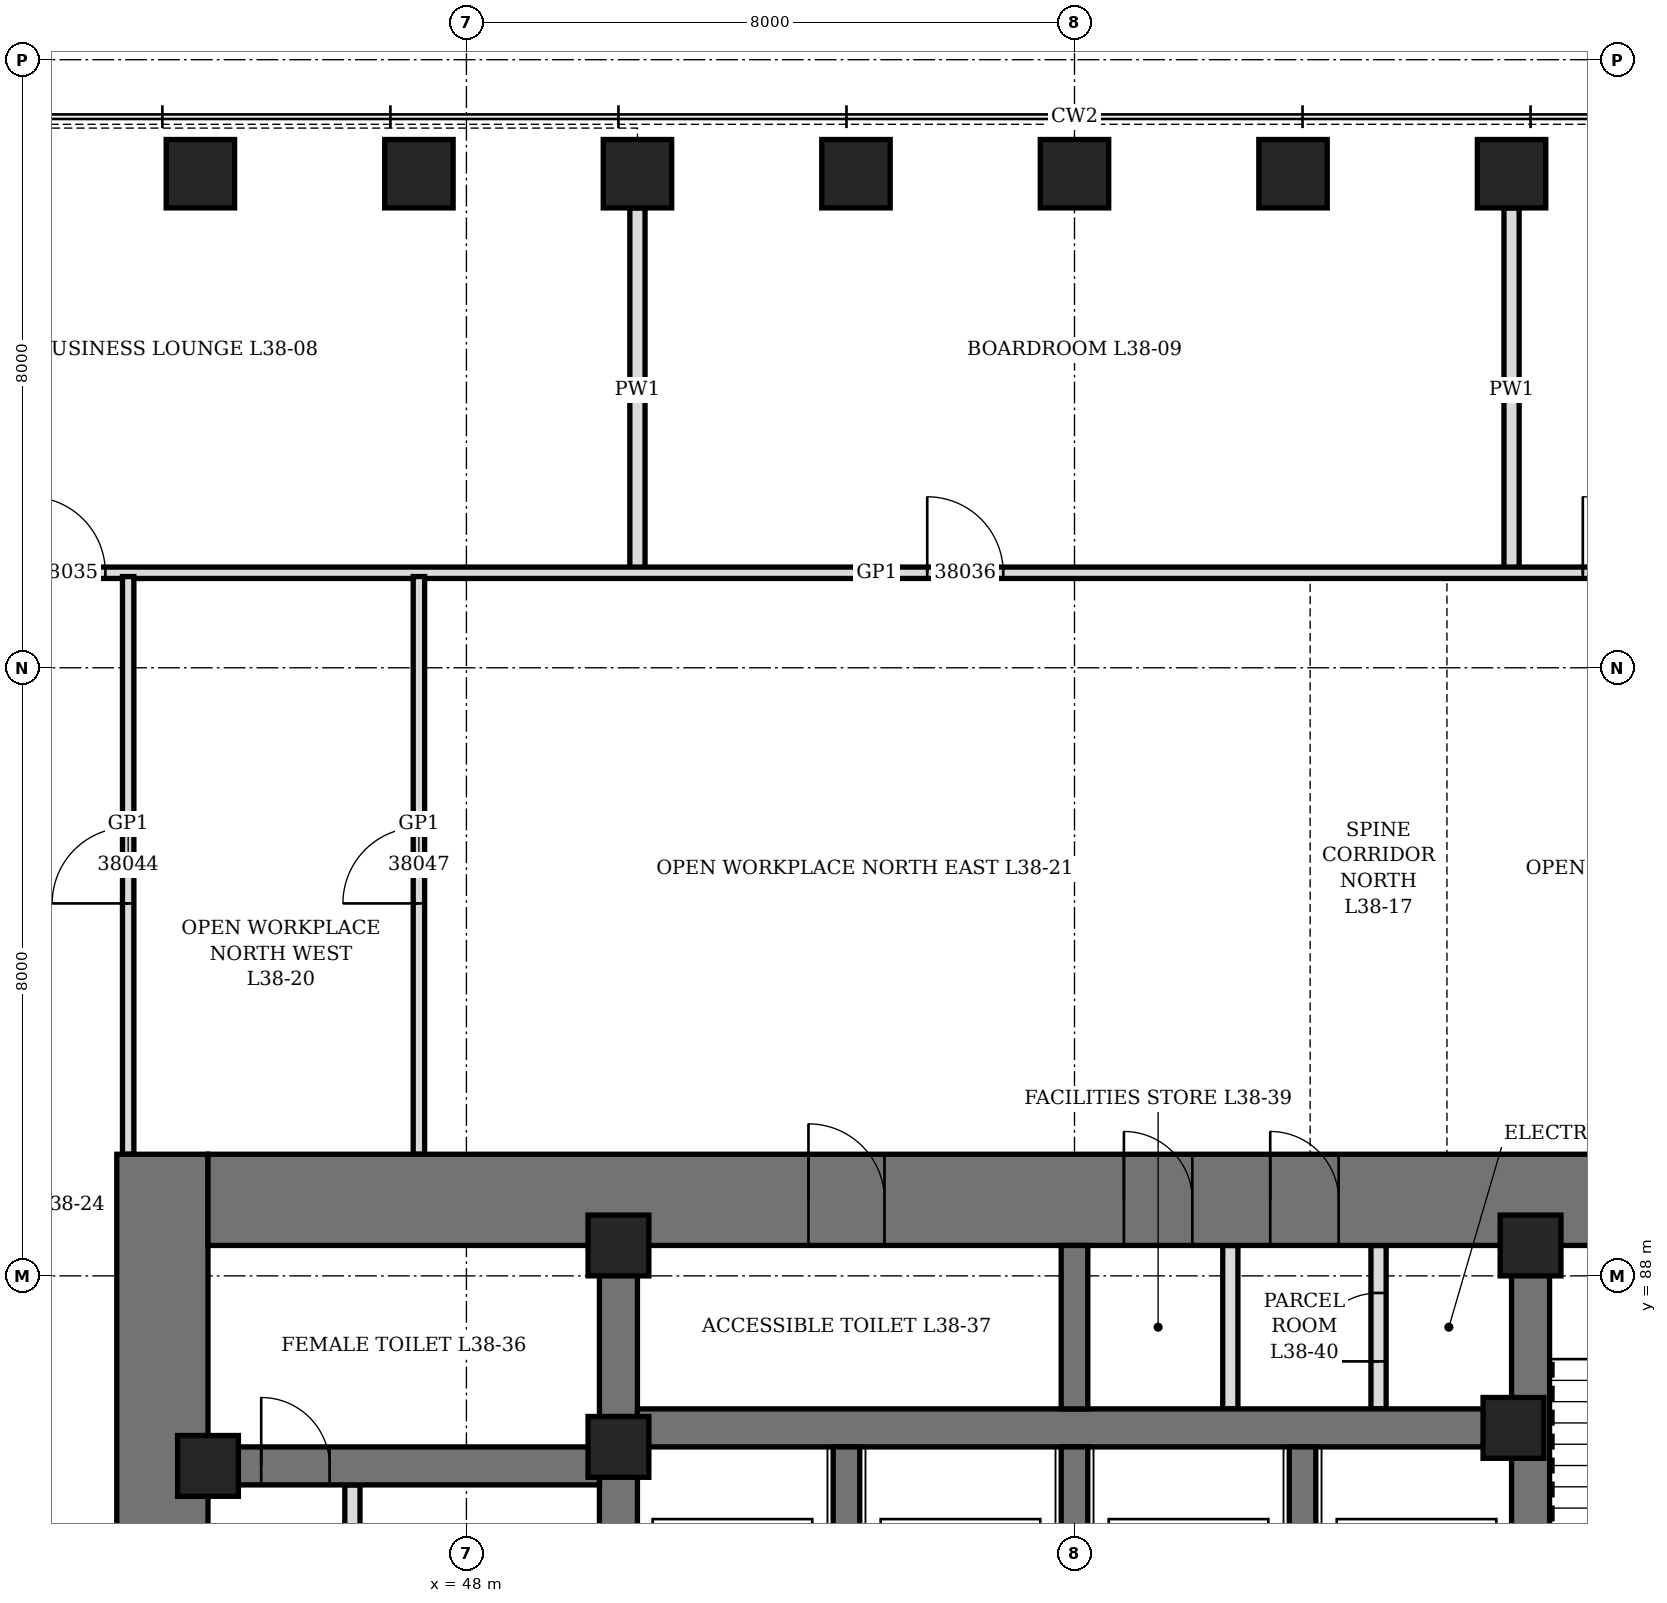
"""IFC4 building model, lengths in metres.
Left out: names, types, materials, properties, quantities, classifications, styles, units other than length and angle.
Written with IfcOpenShell. Run it as: python <this file> out.ifc"""

import sys

from ifc_helpers import new_model, si_unit, direction, frame, frame_2d, origin, origin_2d, place, context, subcontext, project, spatial, rectangle, hollow_rectangle, extrude, element, fill, save


model = new_model("IFC4")
c1 = context("Model", 3, precision=1e-05, world=origin(), true_north=direction((0.0, 1.0)))
c2 = subcontext(c1, "Body", "Model", "MODEL_VIEW")
j1 = project(units=[si_unit("LENGTHUNIT", "METRE"), si_unit("PLANEANGLEUNIT", "RADIAN")], contexts=[c1])
p1 = place(None, origin())
s1 = spatial("IfcSite", under=j1, at=p1, CompositionType="ELEMENT")
p2 = place(p1, origin())
s2 = spatial("IfcBuilding", under=s1, at=p2, CompositionType="ELEMENT")
p3 = place(p2, frame((0.0, 0.0, 171.1)))
s3 = spatial("IfcBuildingStorey", under=s2, at=p3, CompositionType="ELEMENT", Elevation=171.1)
for number, where, z_axis, x_axis in (
    (1, (61.75, 102.5, 0.0), (0.0, 0.0, 1.0), (1.0, 0.0, 0.0)),
    (2, (58.875, 102.5, 0.0), (0.0, 0.0, 1.0), (1.0, 0.0, 0.0)),
    (3, (56.0, 102.5, 0.0), (0.0, 0.0, 1.0), (1.0, 0.0, 0.0)),
    (4, (53.125, 102.5, 0.0), (0.0, 0.0, 1.0), (1.0, 0.0, 0.0)),
    (5, (50.25, 102.5, 0.0), (0.0, 0.0, 1.0), (1.0, 0.0, 0.0)),
    (6, (47.375, 102.5, 0.0), (0.0, 0.0, 1.0), (1.0, 0.0, 0.0)),
    (7, (44.5, 102.5, 0.0), (0.0, 0.0, 1.0), (1.0, 0.0, 0.0)),
):
    element("IfcColumn", number, at=place(p3, frame(where, z_axis=z_axis, x_axis=x_axis)), inside=s3, PredefinedType="COLUMN", context=c2, shape_type="SweptSolid", body=[
        extrude(hollow_rectangle(XDim=0.9, YDim=0.9, WallThickness=0.12, at=origin_2d()), origin(), (0.0, 0.0, 1.0), 4.2),
    ])
p4 = place(p3, frame((44.0, 70.4, 0.0), z_axis=(0.0, 0.0, 1.0), x_axis=(0.0, 1.0, 0.0)))
e8 = element("IfcWall", 8, at=p4, inside=s3, PredefinedType="SHEAR", context=c2, shape_type="SweptSolid", body=[
    extrude(rectangle(XDim=19.2, YDim=1.2, at=frame_2d((9.6, 0.0))), origin(), (0.0, 0.0, 1.0), 4.2),
])
p5 = place(p4, frame((8.6, 0.0, 0.0)))
e9 = element("IfcOpeningElement", 9, at=p5, cuts=e8, PredefinedType="OPENING", context=c2, shape_type="SweptSolid", body=[
    extrude(rectangle(XDim=2.0, YDim=2.4, at=frame_2d((1.0, 1.2))), frame((0.0, 0.61, 0.0), z_axis=(0.0, -1.0, 0.0), x_axis=(1.0, 0.0, 0.0)), (0.0, 0.0, 1.0), 1.22),
])
p6 = place(p3, frame((44.6, 89.0, 0.0), z_axis=(0.0, 0.0, 1.0), x_axis=(1.0, 0.0, 0.0)))
e10 = element("IfcWall", 10, at=p6, inside=s3, PredefinedType="SHEAR", context=c2, shape_type="SweptSolid", body=[
    extrude(rectangle(XDim=22.8, YDim=1.2, at=frame_2d((11.4, 0.0))), origin(), (0.0, 0.0, 1.0), 4.2),
])
p7 = place(p6, frame((7.9, 0.0, 0.0)))
e11 = element("IfcOpeningElement", 11, at=p7, cuts=e10, PredefinedType="OPENING", context=c2, shape_type="SweptSolid", body=[
    extrude(rectangle(XDim=1.0, YDim=2.1, at=frame_2d((0.5, 1.05))), frame((0.0, 0.61, 0.0), z_axis=(0.0, -1.0, 0.0), x_axis=(1.0, 0.0, 0.0)), (0.0, 0.0, 1.0), 1.22),
])
p8 = place(p6, frame((12.05, 0.0, 0.0)))
e12 = element("IfcOpeningElement", 12, at=p8, cuts=e10, PredefinedType="OPENING", context=c2, shape_type="SweptSolid", body=[
    extrude(rectangle(XDim=0.9, YDim=2.1, at=frame_2d((0.45, 1.05))), frame((0.0, 0.61, 0.0), z_axis=(0.0, -1.0, 0.0), x_axis=(1.0, 0.0, 0.0)), (0.0, 0.0, 1.0), 1.22),
])
p9 = place(p6, frame((13.975, 0.0, 0.0)))
e13 = element("IfcOpeningElement", 13, at=p9, cuts=e10, PredefinedType="OPENING", context=c2, shape_type="SweptSolid", body=[
    extrude(rectangle(XDim=0.9, YDim=2.1, at=frame_2d((0.45, 1.05))), frame((0.0, 0.61, 0.0), z_axis=(0.0, -1.0, 0.0), x_axis=(1.0, 0.0, 0.0)), (0.0, 0.0, 1.0), 1.22),
])
p10 = place(p3, frame((50.0, 71.6, 0.0), z_axis=(0.0, 0.0, 1.0), x_axis=(0.0, 1.0, 0.0)))
e14 = element("IfcWall", 14, at=p10, inside=s3, PredefinedType="SHEAR", context=c2, shape_type="SweptSolid", body=[
    extrude(rectangle(XDim=16.8, YDim=0.5, at=frame_2d((8.4, 0.0))), origin(), (0.0, 0.0, 1.0), 4.2),
])
p11 = place(p10, frame((7.5, 0.0, 0.0)))
e15 = element("IfcOpeningElement", 15, at=p11, cuts=e14, PredefinedType="OPENING", context=c2, shape_type="SweptSolid", body=[
    extrude(rectangle(XDim=1.8, YDim=2.4, at=frame_2d((0.9, 1.2))), frame((0.0, 0.26, 0.0), z_axis=(0.0, -1.0, 0.0), x_axis=(1.0, 0.0, 0.0)), (0.0, 0.0, 1.0), 0.52),
])
p12 = place(p3, frame((62.0, 71.6, 0.0), z_axis=(0.0, 0.0, 1.0), x_axis=(0.0, 1.0, 0.0)))
e16 = element("IfcWall", 16, at=p12, inside=s3, PredefinedType="SHEAR", context=c2, shape_type="SweptSolid", body=[
    extrude(rectangle(XDim=16.8, YDim=0.5, at=frame_2d((8.4, 0.0))), origin(), (0.0, 0.0, 1.0), 4.2),
])
p13 = place(p12, frame((7.5, 0.0, 0.0)))
e17 = element("IfcOpeningElement", 17, at=p13, cuts=e16, PredefinedType="OPENING", context=c2, shape_type="SweptSolid", body=[
    extrude(rectangle(XDim=1.8, YDim=2.4, at=frame_2d((0.9, 1.2))), frame((0.0, 0.26, 0.0), z_axis=(0.0, -1.0, 0.0), x_axis=(1.0, 0.0, 0.0)), (0.0, 0.0, 1.0), 0.52),
])
p14 = place(p3, frame((44.6, 85.5, 0.0), z_axis=(0.0, 0.0, 1.0), x_axis=(1.0, 0.0, 0.0)))
e18 = element("IfcWall", 18, at=p14, inside=s3, PredefinedType="SHEAR", context=c2, shape_type="SweptSolid", body=[
    extrude(rectangle(XDim=5.15, YDim=0.5, at=frame_2d((2.575, 0.0))), origin(), (0.0, 0.0, 1.0), 4.2),
])
p15 = place(p14, frame((0.7, 0.0, 0.0)))
e19 = element("IfcOpeningElement", 19, at=p15, cuts=e18, PredefinedType="OPENING", context=c2, shape_type="SweptSolid", body=[
    extrude(rectangle(XDim=0.9, YDim=2.1, at=frame_2d((0.45, 1.05))), frame((0.0, 0.26, 0.0), z_axis=(0.0, -1.0, 0.0), x_axis=(1.0, 0.0, 0.0)), (0.0, 0.0, 1.0), 0.52),
])
p16 = place(p3, frame((50.25, 86.0, 0.0), z_axis=(0.0, 0.0, 1.0), x_axis=(1.0, 0.0, 0.0)))
e20 = element("IfcWall", 20, at=p16, inside=s3, PredefinedType="SHEAR", context=c2, shape_type="SweptSolid", body=[
    extrude(rectangle(XDim=11.5, YDim=0.5, at=frame_2d((5.75, 0.0))), origin(), (0.0, 0.0, 1.0), 4.2),
])
for number, where, z_axis, x_axis in (
    (21, (53.0, 82.25, 0.0), (0.0, 0.0, 1.0), (0.0, 1.0, 0.0)),
    (22, (56.0, 82.25, 0.0), (0.0, 0.0, 1.0), (0.0, 1.0, 0.0)),
    (23, (59.0, 82.25, 0.0), (0.0, 0.0, 1.0), (0.0, 1.0, 0.0)),
):
    element("IfcWall", number, at=place(p3, frame(where, z_axis=z_axis, x_axis=x_axis)), inside=s3, PredefinedType="SHEAR", context=c2, shape_type="SweptSolid", body=[
        extrude(rectangle(XDim=3.5, YDim=0.35, at=frame_2d((1.75, 0.0))), origin(), (0.0, 0.0, 1.0), 4.2),
    ])
p17 = place(p3, frame((56.0, 86.25, 0.0), z_axis=(0.0, 0.0, 1.0), x_axis=(0.0, 1.0, 0.0)))
e24 = element("IfcWall", 24, at=p17, inside=s3, PredefinedType="SHEAR", context=c2, shape_type="SweptSolid", body=[
    extrude(rectangle(XDim=2.15, YDim=0.35, at=frame_2d((1.075, 0.0))), origin(), (0.0, 0.0, 1.0), 4.2),
])
for number, where, z_axis, x_axis in (
    (25, (44.6, 85.5, 0.0), (0.0, 0.0, 1.0), (1.0, 0.0, 0.0)),
    (26, (50.0, 85.75, 0.0), (0.0, 0.0, 1.0), (1.0, 0.0, 0.0)),
    (27, (50.0, 88.4, 0.0), (0.0, 0.0, 1.0), (1.0, 0.0, 0.0)),
    (28, (61.775, 86.0, 0.0), (0.0, 0.0, 1.0), (1.0, 0.0, 0.0)),
    (29, (62.0, 88.4, 0.0), (0.0, 0.0, 1.0), (1.0, 0.0, 0.0)),
):
    element("IfcColumn", number, at=place(p3, frame(where, z_axis=z_axis, x_axis=x_axis)), inside=s3, PredefinedType="COLUMN", context=c2, shape_type="SweptSolid", body=[
        extrude(hollow_rectangle(XDim=0.8, YDim=0.8, WallThickness=0.1, at=origin_2d()), origin(), (0.0, 0.0, 1.0), 4.2),
    ])
p18 = place(p3, frame((46.5, 82.25, 0.0), z_axis=(0.0, 0.0, 1.0), x_axis=(0.0, 1.0, 0.0)))
e30 = element("IfcWall", 30, at=p18, inside=s3, PredefinedType="PARTITIONING", context=c2, shape_type="SweptSolid", body=[
    extrude(rectangle(XDim=3.0, YDim=0.2, at=frame_2d((1.5, 0.0))), origin(), (0.0, 0.0, 1.0), 3.95),
])
p19 = place(p18, frame((1.05, 0.0, 0.0)))
e31 = element("IfcOpeningElement", 31, at=p19, cuts=e30, PredefinedType="OPENING", context=c2, shape_type="SweptSolid", body=[
    extrude(rectangle(XDim=0.9, YDim=2.1, at=frame_2d((0.45, 1.05))), frame((0.0, 0.11, 0.0), z_axis=(0.0, -1.0, 0.0), x_axis=(1.0, 0.0, 0.0)), (0.0, 0.0, 1.0), 0.22),
])
p20 = place(p3, frame((60.0, 86.25, 0.0), z_axis=(0.0, 0.0, 1.0), x_axis=(0.0, 1.0, 0.0)))
e32 = element("IfcWall", 32, at=p20, inside=s3, PredefinedType="PARTITIONING", context=c2, shape_type="SweptSolid", body=[
    extrude(rectangle(XDim=2.15, YDim=0.2, at=frame_2d((1.075, 0.0))), origin(), (0.0, 0.0, 1.0), 3.95),
])
p21 = place(p20, frame((0.625, 0.0, 0.0)))
e33 = element("IfcOpeningElement", 33, at=p21, cuts=e32, PredefinedType="OPENING", context=c2, shape_type="SweptSolid", body=[
    extrude(rectangle(XDim=0.9, YDim=2.1, at=frame_2d((0.45, 1.05))), frame((0.0, 0.11, 0.0), z_axis=(0.0, -1.0, 0.0), x_axis=(1.0, 0.0, 0.0)), (0.0, 0.0, 1.0), 0.22),
])
p22 = place(p3, frame((58.05, 86.25, 0.0), z_axis=(0.0, 0.0, 1.0), x_axis=(0.0, 1.0, 0.0)))
e34 = element("IfcWall", 34, at=p22, inside=s3, PredefinedType="PARTITIONING", context=c2, shape_type="SweptSolid", body=[
    extrude(rectangle(XDim=2.15, YDim=0.2, at=frame_2d((1.075, 0.0))), origin(), (0.0, 0.0, 1.0), 3.95),
])
for number, where, z_axis, x_axis in (
    (35, (50.25, 97.25, 0.0), (0.0, 0.0, 1.0), (0.0, 1.0, 0.0)),
    (36, (61.75, 97.25, 0.0), (0.0, 0.0, 1.0), (0.0, 1.0, 0.0)),
):
    element("IfcWall", number, at=place(p3, frame(where, z_axis=z_axis, x_axis=x_axis)), inside=s3, PredefinedType="PARTITIONING", context=c2, shape_type="SweptSolid", body=[
        extrude(rectangle(XDim=4.8, YDim=0.2, at=frame_2d((2.4, 0.0))), origin(), (0.0, 0.0, 1.0), 2.45),
    ])
p23 = place(p3, frame((39.2, 97.25, 0.0), z_axis=(0.0, 0.0, 1.0), x_axis=(1.0, 0.0, 0.0)))
e37 = element("IfcWall", 37, at=p23, inside=s3, PredefinedType="PARTITIONING", context=c2, shape_type="SweptSolid", body=[
    extrude(rectangle(XDim=28.4, YDim=0.15, at=frame_2d((14.2, 0.0))), origin(), (0.0, 0.0, 1.0), 3.95),
])
p24 = place(p23, frame((3.05, 0.0, 0.0)))
e38 = element("IfcOpeningElement", 38, at=p24, cuts=e37, PredefinedType="OPENING", context=c2, shape_type="SweptSolid", body=[
    extrude(rectangle(XDim=1.0, YDim=2.4, at=frame_2d((0.5, 1.2))), frame((0.0, 0.085, 0.0), z_axis=(0.0, -1.0, 0.0), x_axis=(1.0, 0.0, 0.0)), (0.0, 0.0, 1.0), 0.17),
])
p25 = place(p23, frame((14.863, 0.0, 0.0)))
e39 = element("IfcOpeningElement", 39, at=p25, cuts=e37, PredefinedType="OPENING", context=c2, shape_type="SweptSolid", body=[
    extrude(rectangle(XDim=1.0, YDim=2.4, at=frame_2d((0.5, 1.2))), frame((0.0, 0.085, 0.0), z_axis=(0.0, -1.0, 0.0), x_axis=(1.0, 0.0, 0.0)), (0.0, 0.0, 1.0), 0.17),
])
p26 = place(p23, frame((23.488, 0.0, 0.0)))
e40 = element("IfcOpeningElement", 40, at=p26, cuts=e37, PredefinedType="OPENING", context=c2, shape_type="SweptSolid", body=[
    extrude(rectangle(XDim=1.0, YDim=2.1, at=frame_2d((0.5, 1.05))), frame((0.0, 0.085, 0.0), z_axis=(0.0, -1.0, 0.0), x_axis=(1.0, 0.0, 0.0)), (0.0, 0.0, 1.0), 0.17),
])
p27 = place(p3, frame((43.55, 89.6, 0.0), z_axis=(0.0, 0.0, 1.0), x_axis=(0.0, 1.0, 0.0)))
e41 = element("IfcWall", 41, at=p27, inside=s3, PredefinedType="PARTITIONING", context=c2, shape_type="SweptSolid", body=[
    extrude(rectangle(XDim=7.6, YDim=0.15, at=frame_2d((3.8, 0.0))), origin(), (0.0, 0.0, 1.0), 3.95),
])
p28 = place(p27, frame((3.3, 0.0, 0.0)))
e42 = element("IfcOpeningElement", 42, at=p28, cuts=e41, PredefinedType="OPENING", context=c2, shape_type="SweptSolid", body=[
    extrude(rectangle(XDim=1.0, YDim=2.4, at=frame_2d((0.5, 1.2))), frame((0.0, 0.085, 0.0), z_axis=(0.0, -1.0, 0.0), x_axis=(1.0, 0.0, 0.0)), (0.0, 0.0, 1.0), 0.17),
])
p29 = place(p3, frame((47.375, 89.6, 0.0), z_axis=(0.0, 0.0, 1.0), x_axis=(0.0, 1.0, 0.0)))
e43 = element("IfcWall", 43, at=p29, inside=s3, PredefinedType="PARTITIONING", context=c2, shape_type="SweptSolid", body=[
    extrude(rectangle(XDim=7.6, YDim=0.15, at=frame_2d((3.8, 0.0))), origin(), (0.0, 0.0, 1.0), 2.45),
])
p30 = place(p29, frame((3.3, 0.0, 0.0)))
e44 = element("IfcOpeningElement", 44, at=p30, cuts=e43, PredefinedType="OPENING", context=c2, shape_type="SweptSolid", body=[
    extrude(rectangle(XDim=1.0, YDim=2.4, at=frame_2d((0.5, 1.2))), frame((0.0, 0.085, 0.0), z_axis=(0.0, -1.0, 0.0), x_axis=(1.0, 0.0, 0.0)), (0.0, 0.0, 1.0), 0.17),
])
p31 = place(p15, origin())
e45 = element("IfcDoor", 45, at=p31, inside=s3, OperationType="SINGLE_SWING_RIGHT", PredefinedType="DOOR", context=c2, shape_type="SweptSolid", body=[
    extrude(rectangle(XDim=0.9, YDim=2.1, at=frame_2d((0.45, 1.05))), frame((0.0, 0.25, 0.0), z_axis=(0.0, -1.0, 0.0), x_axis=(1.0, 0.0, 0.0)), (0.0, 0.0, 1.0), 0.5),
])
fill(e19, e45)
p32 = place(p7, origin())
e46 = element("IfcDoor", 46, at=p32, inside=s3, OperationType="SINGLE_SWING_LEFT", PredefinedType="DOOR", context=c2, shape_type="SweptSolid", body=[
    extrude(rectangle(XDim=1.0, YDim=2.1, at=frame_2d((0.5, 1.05))), frame((0.0, 0.35, 0.0), z_axis=(0.0, -1.0, 0.0), x_axis=(1.0, 0.0, 0.0)), (0.0, 0.0, 1.0), 0.7),
])
fill(e11, e46)
p33 = place(p8, origin())
e47 = element("IfcDoor", 47, at=p33, inside=s3, OperationType="SINGLE_SWING_LEFT", PredefinedType="DOOR", context=c2, shape_type="SweptSolid", body=[
    extrude(rectangle(XDim=0.9, YDim=2.1, at=frame_2d((0.45, 1.05))), frame((0.0, 0.35, 0.0), z_axis=(0.0, -1.0, 0.0), x_axis=(1.0, 0.0, 0.0)), (0.0, 0.0, 1.0), 0.7),
])
fill(e12, e47)
p34 = place(p9, origin())
e48 = element("IfcDoor", 48, at=p34, inside=s3, OperationType="SINGLE_SWING_LEFT", PredefinedType="DOOR", context=c2, shape_type="SweptSolid", body=[
    extrude(rectangle(XDim=0.9, YDim=2.1, at=frame_2d((0.45, 1.05))), frame((0.0, 0.35, 0.0), z_axis=(0.0, -1.0, 0.0), x_axis=(1.0, 0.0, 0.0)), (0.0, 0.0, 1.0), 0.7),
])
fill(e13, e48)
p35 = place(p21, origin())
e49 = element("IfcDoor", 49, at=p35, inside=s3, OperationType="SINGLE_SWING_LEFT", PredefinedType="DOOR", context=c2, shape_type="SweptSolid", body=[
    extrude(rectangle(XDim=0.9, YDim=2.1, at=frame_2d((0.45, 1.05))), frame((0.0, 0.1, 0.0), z_axis=(0.0, -1.0, 0.0), x_axis=(1.0, 0.0, 0.0)), (0.0, 0.0, 1.0), 0.199),
])
fill(e33, e49)
p36 = place(p24, origin())
e50 = element("IfcDoor", 50, at=p36, inside=s3, OperationType="SINGLE_SWING_RIGHT", PredefinedType="DOOR", context=c2, shape_type="SweptSolid", body=[
    extrude(rectangle(XDim=1.0, YDim=2.4, at=frame_2d((0.5, 1.2))), frame((0.0, 0.075, 0.0), z_axis=(0.0, -1.0, 0.0), x_axis=(1.0, 0.0, 0.0)), (0.0, 0.0, 1.0), 0.149),
])
fill(e38, e50)
p37 = place(p25, origin())
e51 = element("IfcDoor", 51, at=p37, inside=s3, OperationType="SINGLE_SWING_RIGHT", PredefinedType="DOOR", context=c2, shape_type="SweptSolid", body=[
    extrude(rectangle(XDim=1.0, YDim=2.4, at=frame_2d((0.5, 1.2))), frame((0.0, 0.075, 0.0), z_axis=(0.0, -1.0, 0.0), x_axis=(1.0, 0.0, 0.0)), (0.0, 0.0, 1.0), 0.149),
])
fill(e39, e51)
p38 = place(p26, origin())
e52 = element("IfcDoor", 52, at=p38, inside=s3, OperationType="SINGLE_SWING_LEFT", PredefinedType="DOOR", context=c2, shape_type="SweptSolid", body=[
    extrude(rectangle(XDim=1.0, YDim=2.1, at=frame_2d((0.5, 1.05))), frame((0.0, 0.075, 0.0), z_axis=(0.0, -1.0, 0.0), x_axis=(1.0, 0.0, 0.0)), (0.0, 0.0, 1.0), 0.149),
])
fill(e40, e52)
p39 = place(p28, origin())
e53 = element("IfcDoor", 53, at=p39, inside=s3, OperationType="SINGLE_SWING_RIGHT", PredefinedType="DOOR", context=c2, shape_type="SweptSolid", body=[
    extrude(rectangle(XDim=1.0, YDim=2.4, at=frame_2d((0.5, 1.2))), frame((0.0, 0.075, 0.0), z_axis=(0.0, -1.0, 0.0), x_axis=(1.0, 0.0, 0.0)), (0.0, 0.0, 1.0), 0.149),
])
fill(e42, e53)
p40 = place(p30, origin())
e54 = element("IfcDoor", 54, at=p40, inside=s3, OperationType="SINGLE_SWING_RIGHT", PredefinedType="DOOR", context=c2, shape_type="SweptSolid", body=[
    extrude(rectangle(XDim=1.0, YDim=2.4, at=frame_2d((0.5, 1.2))), frame((0.0, 0.075, 0.0), z_axis=(0.0, -1.0, 0.0), x_axis=(1.0, 0.0, 0.0)), (0.0, 0.0, 1.0), 0.149),
])
fill(e44, e54)
save(model, sys.argv[1])
